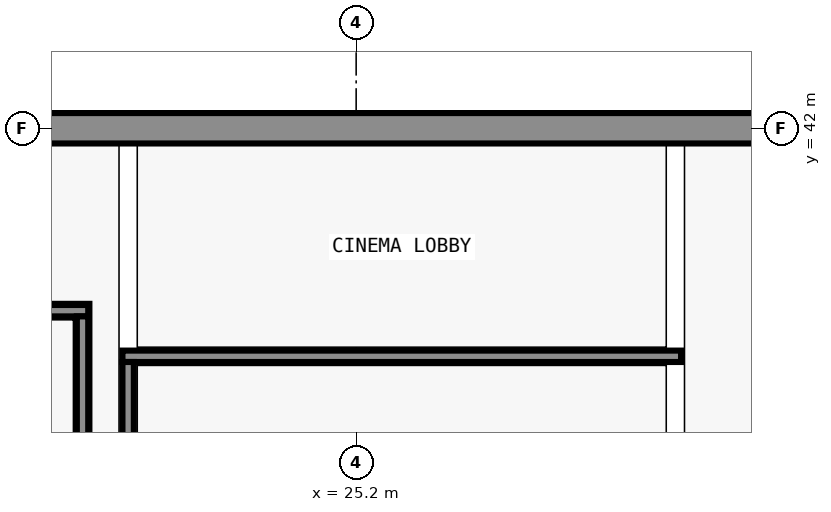
"""IFC4 building model, lengths in metres.
Left out: names, types, materials, properties, quantities, classifications, styles, units other than length and angle.
Written with IfcOpenShell. Run it as: python <this file> out.ifc"""

import sys

from ifc_helpers import new_model, si_unit, direction, frame, frame_2d, origin, place, context, subcontext, project, spatial, rectangle, extrude, element, save


model = new_model("IFC4")
c1 = context("Model", 3, precision=1e-05, world=origin(), true_north=direction((0.0, 1.0)))
c2 = subcontext(c1, "Body", "Model", "MODEL_VIEW")
j1 = project(units=[si_unit("LENGTHUNIT", "METRE"), si_unit("PLANEANGLEUNIT", "RADIAN")], contexts=[c1])
p1 = place(None, origin())
s1 = spatial("IfcSite", under=j1, at=p1, CompositionType="ELEMENT")
p2 = place(p1, origin())
s2 = spatial("IfcBuilding", under=s1, at=p2, CompositionType="ELEMENT")
p3 = place(p2, frame((0.0, 0.0, 15.0)))
s3 = spatial("IfcBuildingStorey", under=s2, at=p3, CompositionType="ELEMENT", Elevation=15.0)
p4 = place(p3, frame((32.0, 42.0, 0.0), z_axis=(0.0, 0.0, 1.0), x_axis=(-1.0, 0.0, 0.0)))
e1 = element("IfcWall", 1, at=p4, inside=s3, PredefinedType="SHEAR", context=c2, shape_type="SweptSolid", body=[
    extrude(rectangle(XDim=15.0, YDim=0.4, at=frame_2d((7.5, 0.0))), origin(), (0.0, 0.0, 1.0), 4.8),
])
p5 = place(p3, frame((22.125, 39.0, 0.0), z_axis=(0.0, 0.0, 1.0), x_axis=(1.0, 0.0, 0.0)))
e2 = element("IfcWall", 2, at=p5, inside=s3, PredefinedType="PARTITIONING", context=c2, shape_type="SweptSolid", body=[
    extrude(rectangle(XDim=7.35, YDim=0.15, at=frame_2d((3.675, 0.0))), origin(), (0.0, 0.0, 1.0), 3.8),
])
p6 = place(p3, frame((17.325, 39.6, 0.0), z_axis=(0.0, 0.0, 1.0), x_axis=(1.0, 0.0, 0.0)))
e3 = element("IfcWall", 3, at=p6, inside=s3, PredefinedType="SOLIDWALL", context=c2, shape_type="SweptSolid", body=[
    extrude(rectangle(XDim=4.35, YDim=0.15, at=frame_2d((2.175, 0.0))), origin(), (0.0, 0.0, 1.0), 3.8),
])
p7 = place(p6, frame((1.575, 0.0, 0.0)))
e4 = element("IfcOpeningElement", 4, at=p7, cuts=e3, PredefinedType="OPENING", context=c2, shape_type="SweptSolid", body=[
    extrude(rectangle(XDim=1.2, YDim=2.1, at=frame_2d((0.6, 1.05))), frame((0.0, 0.085, 0.0), z_axis=(0.0, -1.0, 0.0), x_axis=(1.0, 0.0, 0.0)), (0.0, 0.0, 1.0), 0.17),
])
p8 = place(p3, frame((22.2, 35.325, 0.0), z_axis=(0.0, 0.0, 1.0), x_axis=(0.0, 1.0, 0.0)))
e5 = element("IfcWall", 5, at=p8, inside=s3, PredefinedType="PARTITIONING", context=c2, shape_type="SweptSolid", body=[
    extrude(rectangle(XDim=3.6, YDim=0.15, at=frame_2d((1.8, 0.0))), origin(), (0.0, 0.0, 1.0), 4.5),
])
p9 = place(p8, frame((0.375, 0.0, 0.0)))
e6 = element("IfcOpeningElement", 6, at=p9, cuts=e5, PredefinedType="OPENING", context=c2, shape_type="SweptSolid", body=[
    extrude(rectangle(XDim=0.9, YDim=2.1, at=frame_2d((0.45, 1.05))), frame((0.0, 0.085, 0.0), z_axis=(0.0, -1.0, 0.0), x_axis=(1.0, 0.0, 0.0)), (0.0, 0.0, 1.0), 0.17),
])
p10 = place(p3, frame((21.6, 36.525, 0.0), z_axis=(0.0, 0.0, 1.0), x_axis=(0.0, 1.0, 0.0)))
e7 = element("IfcWall", 7, at=p10, inside=s3, PredefinedType="SOLIDWALL", context=c2, shape_type="SweptSolid", body=[
    extrude(rectangle(XDim=3.0, YDim=0.15, at=frame_2d((1.5, 0.0))), origin(), (0.0, 0.0, 1.0), 4.5),
])
save(model, sys.argv[1])
